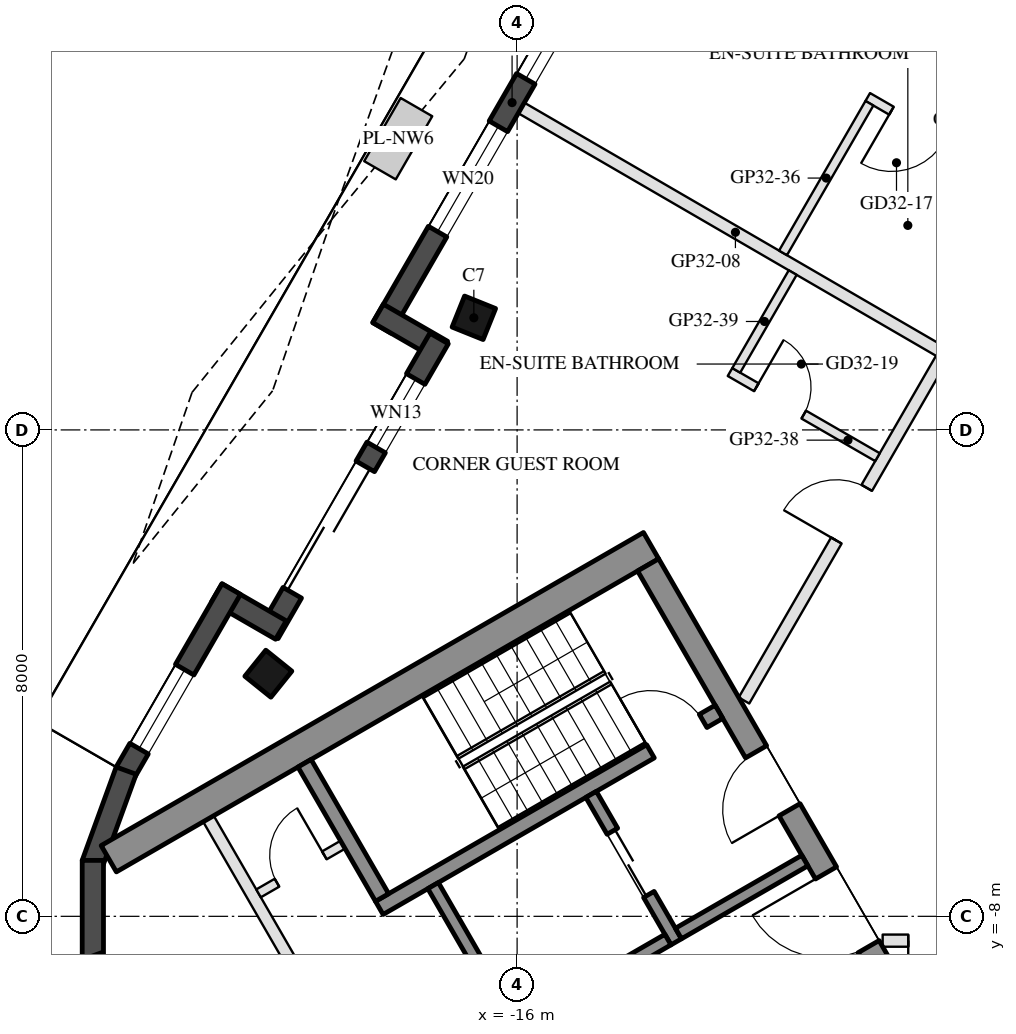
"""IFC4 building model, lengths in metres.
Left out: names, types, materials, properties, quantities, classifications, styles, units other than length and angle.
Written with IfcOpenShell. Run it as: python <this file> out.ifc"""

import sys

from ifc_helpers import new_model, si_unit, direction, frame, frame_2d, origin, origin_2d, place, context, subcontext, project, spatial, rectangle, hollow_rectangle, extrude, boolean, halfspace, element, fill, save


model = new_model("IFC4")
c1 = context("Model", 3, precision=1e-05, world=origin(), true_north=direction((0.0, 1.0)))
c2 = subcontext(c1, "Body", "Model", "MODEL_VIEW")
j1 = project(units=[si_unit("LENGTHUNIT", "METRE"), si_unit("PLANEANGLEUNIT", "RADIAN")], contexts=[c1])
p1 = place(None, origin())
s1 = spatial("IfcSite", under=j1, at=p1, CompositionType="ELEMENT")
p2 = place(p1, origin())
s2 = spatial("IfcBuilding", under=s1, at=p2, CompositionType="ELEMENT")
p3 = place(p2, frame((0.0, 0.0, 309.6)))
s3 = spatial("IfcBuildingStorey", under=s2, at=p3, CompositionType="ELEMENT", Elevation=309.6)
p4 = place(p3, frame((-16.711, 1.844, 0.0), z_axis=(0.161388519526, -0.022915997932, 0.986624854139), x_axis=(-0.495109873729, -0.866696335889, 0.060857820306)))
e1 = element("IfcColumn", 1, at=p4, inside=s3, PredefinedType="COLUMN", context=c2, shape_type="SweptSolid", body=[
    boolean("DIFFERENCE", boolean("DIFFERENCE", extrude(hollow_rectangle(XDim=0.55, YDim=0.55, WallThickness=0.025, at=origin_2d()), origin(), (0.0, 0.0, 1.0), 3.75), halfspace(frame((0.0, 0.0, 0.034), z_axis=(0.0, 0.0, 1.0), x_axis=(1.0, 0.0, 0.0)), True)), halfspace(frame((0.0, 0.0, 3.716), z_axis=(0.0, 0.0, 1.0), x_axis=(1.0, 0.0, 0.0)), False)),
])
p5 = place(p3, frame((-20.091, -4.01, 0.0), z_axis=(0.190797858838, 0.029652330963, 0.981181388088), x_axis=(-0.488342494533, -0.86421146304, 0.121079127777)))
e2 = element("IfcColumn", 2, at=p5, inside=s3, PredefinedType="COLUMN", context=c2, shape_type="SweptSolid", body=[
    boolean("DIFFERENCE", boolean("DIFFERENCE", extrude(hollow_rectangle(XDim=0.55, YDim=0.55, WallThickness=0.025, at=origin_2d()), origin(), (0.0, 0.0, 1.0), 3.771), halfspace(frame((0.0, 0.0, 0.04), z_axis=(0.0, 0.0, 1.0), x_axis=(1.0, 0.0, 0.0)), True)), halfspace(frame((0.0, 0.0, 3.731), z_axis=(0.0, 0.0, 1.0), x_axis=(1.0, 0.0, 0.0)), False)),
])
p6 = place(p3, frame((-13.943, 9.089, 0.0), z_axis=(0.0, 0.0, 1.0), x_axis=(-0.500013816581, -0.866017426631, 0.0)))
e3 = element("IfcWall", 3, at=p6, inside=s3, PredefinedType="SOLIDWALL", context=c2, shape_type="SweptSolid", body=[
    extrude(rectangle(XDim=8.559, YDim=0.35, at=frame_2d((4.279, 0.0))), origin(), (0.0, 0.0, 1.0), 3.55),
])
p7 = place(p6, frame((1.528, 0.0, 0.3)))
e4 = element("IfcOpeningElement", 4, at=p7, cuts=e3, PredefinedType="OPENING", context=c2, shape_type="SweptSolid", body=[
    extrude(rectangle(XDim=2.3, YDim=2.65, at=frame_2d((1.15, 1.325))), frame((0.0, 0.185, 0.0), z_axis=(0.0, -1.0, 0.0), x_axis=(1.0, 0.0, 0.0)), (0.0, 0.0, 1.0), 0.37),
])
p8 = place(p6, frame((4.729, 0.0, 0.3)))
e5 = element("IfcOpeningElement", 5, at=p8, cuts=e3, PredefinedType="OPENING", context=c2, shape_type="SweptSolid", body=[
    extrude(rectangle(XDim=2.0, YDim=2.65, at=frame_2d((1.0, 1.325))), frame((0.0, 0.185, 0.0), z_axis=(0.0, -1.0, 0.0), x_axis=(1.0, 0.0, 0.0)), (0.0, 0.0, 1.0), 0.37),
])
p9 = place(p3, frame((-18.287, 1.916, 0.0), z_axis=(0.0, 0.0, 1.0), x_axis=(0.866142280446, -0.499797509021, 0.0)))
e6 = element("IfcWall", 6, at=p9, inside=s3, PredefinedType="SOLIDWALL", context=c2, shape_type="SweptSolid", body=[
    extrude(rectangle(XDim=1.22, YDim=0.35, at=frame_2d((0.61, 0.0))), origin(), (0.0, 0.0, 1.0), 3.55),
])
p10 = place(p3, frame((-17.283, 1.504, 0.0), z_axis=(0.0, 0.0, 1.0), x_axis=(-0.500008054862, -0.866020753258, 0.0)))
e7 = element("IfcWall", 7, at=p10, inside=s3, PredefinedType="SOLIDWALL", context=c2, shape_type="SweptSolid", body=[
    extrude(rectangle(XDim=5.599, YDim=0.35, at=frame_2d((2.8, 0.0))), origin(), (0.0, 0.0, 1.0), 3.55),
])
p11 = place(p10, frame((2.429, 0.0, 0.0)))
e8 = element("IfcOpeningElement", 8, at=p11, cuts=e7, PredefinedType="OPENING", context=c2, shape_type="SweptSolid", body=[
    extrude(rectangle(XDim=2.4, YDim=2.4, at=frame_2d((1.2, 1.2))), frame((0.0, 0.185, 0.0), z_axis=(0.0, -1.0, 0.0), x_axis=(1.0, 0.0, 0.0)), (0.0, 0.0, 1.0), 0.37),
])
p12 = place(p10, frame((0.77, 0.0, 0.3)))
e9 = element("IfcOpeningElement", 9, at=p12, cuts=e7, PredefinedType="OPENING", context=c2, shape_type="SweptSolid", body=[
    extrude(rectangle(XDim=1.3, YDim=2.65, at=frame_2d((0.65, 1.325))), frame((0.0, 0.185, 0.0), z_axis=(0.0, -1.0, 0.0), x_axis=(1.0, 0.0, 0.0)), (0.0, 0.0, 1.0), 0.37),
])
p13 = place(p3, frame((-19.884, -3.292, 0.0), z_axis=(0.0, 0.0, 1.0), x_axis=(-0.866005645448, 0.500034220881, 0.0)))
e10 = element("IfcWall", 10, at=p13, inside=s3, PredefinedType="SOLIDWALL", context=c2, shape_type="SweptSolid", body=[
    extrude(rectangle(XDim=1.22, YDim=0.35, at=frame_2d((0.61, 0.0))), origin(), (0.0, 0.0, 1.0), 3.55),
])
p14 = place(p3, frame((-20.702, -2.618, 0.0), z_axis=(0.0, 0.0, 1.0), x_axis=(-0.499979528911, -0.866037222451, 0.0)))
e11 = element("IfcWall", 11, at=p14, inside=s3, PredefinedType="SOLIDWALL", context=c2, shape_type="SweptSolid", body=[
    extrude(rectangle(XDim=3.48, YDim=0.35, at=frame_2d((1.74, 0.0))), origin(), (0.0, 0.0, 1.0), 3.55),
])
p15 = place(p14, frame((1.531, 0.0, 0.3)))
e12 = element("IfcOpeningElement", 12, at=p15, cuts=e11, PredefinedType="OPENING", context=c2, shape_type="SweptSolid", body=[
    extrude(rectangle(XDim=1.5, YDim=2.65, at=frame_2d((0.75, 1.325))), frame((0.0, 0.185, 0.0), z_axis=(0.0, -1.0, 0.0), x_axis=(1.0, 0.0, 0.0)), (0.0, 0.0, 1.0), 0.37),
])
for number, where, z_axis, x_axis in (
    (13, (-22.429, -5.604, 0.0), (0.0, 0.0, 1.0), (-0.342, -0.94, 0.0)),
    (14, (-22.977, -7.08, 0.0), (0.0, 0.0, 1.0), (0.0, -1.0, 0.0)),
    (15, (-22.988, -8.654, 0.0), (0.0, 0.0, 1.0), (0.342, -0.94, 0.0)),
):
    element("IfcWall", number, at=place(p3, frame(where, z_axis=z_axis, x_axis=x_axis)), inside=s3, PredefinedType="SOLIDWALL", context=c2, shape_type="SweptSolid", body=[
        extrude(rectangle(XDim=1.634, YDim=0.35, at=frame_2d((0.817, 0.0))), origin(), (0.0, 0.0, 1.0), 3.55),
    ])
p16 = place(p3, frame((-13.797, -1.903, 0.0), z_axis=(0.0, 0.0, 1.0), x_axis=(-0.866027279078, -0.499996751883, 0.0)))
e16 = element("IfcWall", 16, at=p16, inside=s3, PredefinedType="SHEAR", context=c2, shape_type="SweptSolid", body=[
    extrude(rectangle(XDim=10.298, YDim=0.5, at=frame_2d((5.149, 0.0))), origin(), (0.0, 0.0, 1.0), 3.5),
])
p17 = place(p3, frame((-13.845, -2.22, 0.0), z_axis=(0.0, 0.0, 1.0), x_axis=(0.500004234368, -0.866022959057, 0.0)))
e17 = element("IfcWall", 17, at=p17, inside=s3, PredefinedType="SHEAR", context=c2, shape_type="SweptSolid", body=[
    extrude(rectangle(XDim=10.0, YDim=0.4, at=frame_2d((5.0, 0.0))), origin(), (0.0, 0.0, 1.0), 3.5),
])
p18 = place(p17, frame((3.55, 0.0, 0.0)))
e18 = element("IfcOpeningElement", 18, at=p18, cuts=e17, PredefinedType="OPENING", context=c2, shape_type="SweptSolid", body=[
    extrude(rectangle(XDim=1.1, YDim=2.1, at=frame_2d((0.55, 1.05))), frame((0.0, 0.21, 0.0), z_axis=(0.0, -1.0, 0.0), x_axis=(1.0, 0.0, 0.0)), (0.0, 0.0, 1.0), 0.42),
])
p19 = place(p17, frame((5.85, 0.0, 0.0)))
e19 = element("IfcOpeningElement", 19, at=p19, cuts=e17, PredefinedType="OPENING", context=c2, shape_type="SweptSolid", body=[
    extrude(rectangle(XDim=1.4, YDim=2.1, at=frame_2d((0.7, 1.05))), frame((0.0, 0.21, 0.0), z_axis=(0.0, -1.0, 0.0), x_axis=(1.0, 0.0, 0.0)), (0.0, 0.0, 1.0), 0.42),
])
p20 = place(p3, frame((-12.681, -4.636, 0.0), z_axis=(0.0, 0.0, 1.0), x_axis=(-0.866021702275, -0.500006411147, 0.0)))
e20 = element("IfcWall", 20, at=p20, inside=s3, PredefinedType="SHEAR", context=c2, shape_type="SweptSolid", body=[
    extrude(rectangle(XDim=6.45, YDim=0.25, at=frame_2d((3.225, 0.0))), origin(), (0.0, 0.0, 1.0), 3.5),
])
p21 = place(p20, frame((0.3, 0.0, 0.0)))
e21 = element("IfcOpeningElement", 21, at=p21, cuts=e20, PredefinedType="OPENING", context=c2, shape_type="SweptSolid", body=[
    extrude(rectangle(XDim=1.0, YDim=2.1, at=frame_2d((0.5, 1.05))), frame((0.0, 0.135, 0.0), z_axis=(0.0, -1.0, 0.0), x_axis=(1.0, 0.0, 0.0)), (0.0, 0.0, 1.0), 0.27),
])
p22 = place(p3, frame((-19.496, -5.482, 0.0), z_axis=(0.0, 0.0, 1.0), x_axis=(0.499990435942, -0.866030925526, 0.0)))
e22 = element("IfcWall", 22, at=p22, inside=s3, PredefinedType="SHEAR", context=c2, shape_type="SweptSolid", body=[
    extrude(rectangle(XDim=2.55, YDim=0.25, at=frame_2d((1.275, 0.0))), origin(), (0.0, 0.0, 1.0), 3.5),
])
p23 = place(p3, frame((-17.381, -7.495, 0.0), z_axis=(0.0, 0.0, 1.0), x_axis=(0.500011755427, -0.866018616679, 0.0)))
e23 = element("IfcWall", 23, at=p23, inside=s3, PredefinedType="SHEAR", context=c2, shape_type="SweptSolid", body=[
    extrude(rectangle(XDim=2.8, YDim=0.2, at=frame_2d((1.4, 0.0))), origin(), (0.0, 0.0, 1.0), 3.5),
])
p24 = place(p3, frame((-14.783, -5.995, 0.0), z_axis=(0.0, 0.0, 1.0), x_axis=(0.49994636267, -0.866056369097, 0.0)))
e24 = element("IfcWall", 24, at=p24, inside=s3, PredefinedType="SHEAR", context=c2, shape_type="SweptSolid", body=[
    extrude(rectangle(XDim=2.8, YDim=0.2, at=frame_2d((1.4, 0.0))), origin(), (0.0, 0.0, 1.0), 3.5),
])
p25 = place(p24, frame((0.7, 0.0, 0.0)))
e25 = element("IfcOpeningElement", 25, at=p25, cuts=e24, PredefinedType="OPENING", context=c2, shape_type="SweptSolid", body=[
    extrude(rectangle(XDim=1.2, YDim=2.1, at=frame_2d((0.6, 1.05))), frame((0.0, 0.11, 0.0), z_axis=(0.0, -1.0, 0.0), x_axis=(1.0, 0.0, 0.0)), (0.0, 0.0, 1.0), 0.22),
])
p26 = place(p3, frame((-13.52, -8.383, 0.0), z_axis=(0.0, 0.0, 1.0), x_axis=(-0.866034573852, -0.49998411664, 0.0)))
e26 = element("IfcWall", 26, at=p26, inside=s3, PredefinedType="SHEAR", context=c2, shape_type="SweptSolid", body=[
    extrude(rectangle(XDim=2.8, YDim=0.2, at=frame_2d((1.4, 0.0))), origin(), (0.0, 0.0, 1.0), 3.5),
])
p27 = place(p3, frame((-11.268, -7.083, 0.0), z_axis=(0.0, 0.0, 1.0), x_axis=(-0.866050077142, -0.499957262057, 0.0)))
e27 = element("IfcWall", 27, at=p27, inside=s3, PredefinedType="SHEAR", context=c2, shape_type="SweptSolid", body=[
    extrude(rectangle(XDim=2.4, YDim=0.2, at=frame_2d((1.2, 0.0))), origin(), (0.0, 0.0, 1.0), 3.5),
])
p28 = place(p3, frame((-21.076, -6.395, 0.0), z_axis=(0.0, 0.0, 1.0), x_axis=(0.50001468107, -0.866016927499, 0.0)))
e28 = element("IfcWall", 28, at=p28, inside=s3, PredefinedType="PARTITIONING", context=c2, shape_type="SweptSolid", body=[
    extrude(rectangle(XDim=5.4, YDim=0.2, at=frame_2d((2.7, 0.0))), origin(), (0.0, 0.0, 1.0), 3.5),
])
p29 = place(p28, frame((2.9, 0.0, 0.0)))
e29 = element("IfcOpeningElement", 29, at=p29, cuts=e28, PredefinedType="OPENING", context=c2, shape_type="SweptSolid", body=[
    extrude(rectangle(XDim=0.9, YDim=2.1, at=frame_2d((0.45, 1.05))), frame((0.0, 0.11, 0.0), z_axis=(0.0, -1.0, 0.0), x_axis=(1.0, 0.0, 0.0)), (0.0, 0.0, 1.0), 0.22),
])
p30 = place(p3, frame((-18.866, -6.822, 0.0), z_axis=(0.0, 0.0, 1.0), x_axis=(-0.866028054938, -0.499995408039, 0.0)))
e30 = element("IfcWall", 30, at=p30, inside=s3, PredefinedType="PARTITIONING", context=c2, shape_type="SweptSolid", body=[
    extrude(rectangle(XDim=1.6, YDim=0.15, at=frame_2d((0.8, 0.0))), origin(), (0.0, 0.0, 1.0), 3.5),
])
p31 = place(p30, frame((0.35, 0.0, 0.0)))
e31 = element("IfcOpeningElement", 31, at=p31, cuts=e30, PredefinedType="OPENING", context=c2, shape_type="SweptSolid", body=[
    extrude(rectangle(XDim=0.9, YDim=2.1, at=frame_2d((0.45, 1.05))), frame((0.0, 0.085, 0.0), z_axis=(0.0, -1.0, 0.0), x_axis=(1.0, 0.0, 0.0)), (0.0, 0.0, 1.0), 0.17),
])
p32 = place(p3, frame((-15.931, 5.296, 0.0), z_axis=(0.0, 0.0, 1.0), x_axis=(0.86472973631, -0.502237476839, 0.0)))
e32 = element("IfcWall", 32, at=p32, inside=s3, PredefinedType="PARTITIONING", context=c2, shape_type="SweptSolid", body=[
    extrude(rectangle(XDim=8.145, YDim=0.2, at=frame_2d((4.072, 0.0))), origin(), (0.0, 0.0, 1.0), 3.1),
])
p33 = place(p3, frame((-5.585, -8.4, 0.0), z_axis=(0.0, 0.0, 1.0), x_axis=(-1.0, 0.0, 0.0)))
e33 = element("IfcWall", 33, at=p33, inside=s3, PredefinedType="PARTITIONING", context=c2, shape_type="SweptSolid", body=[
    extrude(rectangle(XDim=4.403, YDim=0.2, at=frame_2d((2.201, 0.0))), origin(), (0.0, 0.0, 1.0), 3.1),
])
p34 = place(p33, frame((2.982, 0.0, 0.0)))
e34 = element("IfcOpeningElement", 34, at=p34, cuts=e33, PredefinedType="OPENING", context=c2, shape_type="SweptSolid", body=[
    extrude(rectangle(XDim=1.0, YDim=2.1, at=frame_2d((0.5, 1.05))), frame((0.0, 0.11, 0.0), z_axis=(0.0, -1.0, 0.0), x_axis=(1.0, 0.0, 0.0)), (0.0, 0.0, 1.0), 0.22),
])
p35 = place(p3, frame((-7.549, 3.925, 0.0), z_axis=(0.0, 0.0, 1.0), x_axis=(-0.866063626216, 0.499933790963, 0.0)))
e35 = element("IfcWall", 35, at=p35, inside=s3, PredefinedType="PARTITIONING", context=c2, shape_type="SweptSolid", body=[
    extrude(rectangle(XDim=3.1, YDim=0.15, at=frame_2d((1.55, 0.0))), origin(), (0.0, 0.0, 1.0), 3.55),
])
p36 = place(p35, frame((1.65, 0.0, 0.0)))
e36 = element("IfcOpeningElement", 36, at=p36, cuts=e35, PredefinedType="OPENING", context=c2, shape_type="SweptSolid", body=[
    extrude(rectangle(XDim=1.0, YDim=2.1, at=frame_2d((0.5, 1.05))), frame((0.0, 0.085, 0.0), z_axis=(0.0, -1.0, 0.0), x_axis=(1.0, 0.0, 0.0)), (0.0, 0.0, 1.0), 0.17),
])
p37 = place(p3, frame((-10.206, 5.373, 0.0), z_axis=(0.0, 0.0, 1.0), x_axis=(-0.500009958894, -0.866019653938, 0.0)))
e37 = element("IfcWall", 37, at=p37, inside=s3, PredefinedType="PARTITIONING", context=c2, shape_type="SweptSolid", body=[
    extrude(rectangle(XDim=2.842, YDim=0.15, at=frame_2d((1.421, 0.0))), origin(), (0.0, 0.0, 1.0), 3.1),
])
p38 = place(p3, frame((-12.269, -4.45, 0.0), z_axis=(0.0, 0.0, 1.0), x_axis=(0.500024296538, 0.866011375717, 0.0)))
e38 = element("IfcWall", 38, at=p38, inside=s3, PredefinedType="PARTITIONING", context=c2, shape_type="SweptSolid", body=[
    extrude(rectangle(XDim=6.488, YDim=0.2, at=frame_2d((3.244, 0.0))), origin(), (0.0, 0.0, 1.0), 3.1),
])
p39 = place(p38, frame((3.038, 0.0, 0.0)))
e39 = element("IfcOpeningElement", 39, at=p39, cuts=e38, PredefinedType="OPENING", context=c2, shape_type="SweptSolid", body=[
    extrude(rectangle(XDim=1.0, YDim=2.1, at=frame_2d((0.5, 1.05))), frame((0.0, 0.11, 0.0), z_axis=(0.0, -1.0, 0.0), x_axis=(1.0, 0.0, 0.0)), (0.0, 0.0, 1.0), 0.22),
])
p40 = place(p3, frame((-12.499, 0.952, 0.0), z_axis=(0.0, 0.0, 1.0), x_axis=(0.865996816683, -0.500049511043, 0.0)))
e40 = element("IfcWall", 40, at=p40, inside=s3, PredefinedType="PARTITIONING", context=c2, shape_type="SweptSolid", body=[
    extrude(rectangle(XDim=2.8, YDim=0.15, at=frame_2d((1.4, 0.0))), origin(), (0.0, 0.0, 1.0), 3.55),
])
p41 = place(p40, frame((0.5, 0.0, 0.0)))
e41 = element("IfcOpeningElement", 41, at=p41, cuts=e40, PredefinedType="OPENING", context=c2, shape_type="SweptSolid", body=[
    extrude(rectangle(XDim=0.9, YDim=2.1, at=frame_2d((0.45, 1.05))), frame((0.0, 0.085, 0.0), z_axis=(0.0, -1.0, 0.0), x_axis=(1.0, 0.0, 0.0)), (0.0, 0.0, 1.0), 0.17),
])
p42 = place(p3, frame((-11.468, 2.587, 0.0), z_axis=(0.0, 0.0, 1.0), x_axis=(-0.499999386358, -0.86602575807, 0.0)))
e42 = element("IfcWall", 42, at=p42, inside=s3, PredefinedType="PARTITIONING", context=c2, shape_type="SweptSolid", body=[
    extrude(rectangle(XDim=1.857, YDim=0.15, at=frame_2d((0.928, 0.0))), origin(), (0.0, 0.0, 1.0), 3.55),
])
p43 = place(p7, origin())
e43 = element("IfcWindow", 43, at=p43, inside=s3, PartitioningType="SINGLE_PANEL", PredefinedType="WINDOW", context=c2, shape_type="SweptSolid", body=[
    extrude(rectangle(XDim=2.3, YDim=2.65, at=frame_2d((1.15, 1.325))), frame((0.0, 0.03, 0.0), z_axis=(0.0, -1.0, 0.0), x_axis=(1.0, 0.0, 0.0)), (0.0, 0.0, 1.0), 0.06),
])
fill(e4, e43)
p44 = place(p8, origin())
e44 = element("IfcWindow", 44, at=p44, inside=s3, PartitioningType="SINGLE_PANEL", PredefinedType="WINDOW", context=c2, shape_type="SweptSolid", body=[
    extrude(rectangle(XDim=2.0, YDim=2.65, at=frame_2d((1.0, 1.325))), frame((0.0, 0.03, 0.0), z_axis=(0.0, -1.0, 0.0), x_axis=(1.0, 0.0, 0.0)), (0.0, 0.0, 1.0), 0.06),
])
fill(e5, e44)
p45 = place(p11, frame((2.4, 0.0, 0.0), z_axis=(0.0, 0.0, 1.0), x_axis=(-1.0, 0.0, 0.0)))
e45 = element("IfcDoor", 45, at=p45, inside=s3, OperationType="SLIDING_TO_LEFT", PredefinedType="DOOR", context=c2, shape_type="SweptSolid", body=[
    extrude(rectangle(XDim=2.4, YDim=2.4, at=frame_2d((1.2, 1.2))), frame((0.0, 0.025, 0.0), z_axis=(0.0, -1.0, 0.0), x_axis=(1.0, 0.0, 0.0)), (0.0, 0.0, 1.0), 0.05),
])
fill(e8, e45)
p46 = place(p12, origin())
e46 = element("IfcWindow", 46, at=p46, inside=s3, PartitioningType="SINGLE_PANEL", PredefinedType="WINDOW", context=c2, shape_type="SweptSolid", body=[
    extrude(rectangle(XDim=1.3, YDim=2.65, at=frame_2d((0.65, 1.325))), frame((0.0, 0.03, 0.0), z_axis=(0.0, -1.0, 0.0), x_axis=(1.0, 0.0, 0.0)), (0.0, 0.0, 1.0), 0.06),
])
fill(e9, e46)
p47 = place(p15, origin())
e47 = element("IfcWindow", 47, at=p47, inside=s3, PartitioningType="SINGLE_PANEL", PredefinedType="WINDOW", context=c2, shape_type="SweptSolid", body=[
    extrude(rectangle(XDim=1.5, YDim=2.65, at=frame_2d((0.75, 1.325))), frame((0.0, 0.03, 0.0), z_axis=(0.0, -1.0, 0.0), x_axis=(1.0, 0.0, 0.0)), (0.0, 0.0, 1.0), 0.06),
])
fill(e12, e47)
p48 = place(p25, origin())
e48 = element("IfcDoor", 48, at=p48, inside=s3, OperationType="DOUBLE_DOOR_SLIDING", PredefinedType="DOOR", context=c2, shape_type="SweptSolid", body=[
    extrude(rectangle(XDim=1.2, YDim=2.1, at=frame_2d((0.6, 1.05))), frame((0.0, 0.025, 0.0), z_axis=(0.0, -1.0, 0.0), x_axis=(1.0, 0.0, 0.0)), (0.0, 0.0, 1.0), 0.05),
])
fill(e25, e48)
p49 = place(p31, frame((0.9, 0.0, 0.0), z_axis=(0.0, 0.0, 1.0), x_axis=(-1.0, 0.0, 0.0)))
e49 = element("IfcDoor", 49, at=p49, inside=s3, OperationType="SINGLE_SWING_RIGHT", PredefinedType="DOOR", context=c2, shape_type="SweptSolid", body=[
    extrude(rectangle(XDim=0.9, YDim=2.1, at=frame_2d((0.45, 1.05))), frame((0.0, 0.025, 0.0), z_axis=(0.0, -1.0, 0.0), x_axis=(1.0, 0.0, 0.0)), (0.0, 0.0, 1.0), 0.05),
])
fill(e31, e49)
p50 = place(p18, frame((1.1, 0.0, 0.0), z_axis=(0.0, 0.0, 1.0), x_axis=(-1.0, 0.0, 0.0)))
e50 = element("IfcDoor", 50, at=p50, inside=s3, OperationType="SINGLE_SWING_LEFT", PredefinedType="DOOR", context=c2, shape_type="SweptSolid", body=[
    extrude(rectangle(XDim=1.1, YDim=2.1, at=frame_2d((0.55, 1.05))), frame((0.0, 0.025, 0.0), z_axis=(0.0, -1.0, 0.0), x_axis=(1.0, 0.0, 0.0)), (0.0, 0.0, 1.0), 0.05),
])
fill(e18, e50)
p51 = place(p19, frame((1.4, 0.0, 0.0), z_axis=(0.0, 0.0, 1.0), x_axis=(-1.0, 0.0, 0.0)))
e51 = element("IfcDoor", 51, at=p51, inside=s3, OperationType="DOUBLE_DOOR_SINGLE_SWING", PredefinedType="DOOR", context=c2, shape_type="SweptSolid", body=[
    extrude(rectangle(XDim=1.4, YDim=2.1, at=frame_2d((0.7, 1.05))), frame((0.0, 0.025, 0.0), z_axis=(0.0, -1.0, 0.0), x_axis=(1.0, 0.0, 0.0)), (0.0, 0.0, 1.0), 0.05),
])
fill(e19, e51)
p52 = place(p21, frame((1.0, 0.0, 0.0), z_axis=(0.0, 0.0, 1.0), x_axis=(-1.0, 0.0, 0.0)))
e52 = element("IfcDoor", 52, at=p52, inside=s3, OperationType="SINGLE_SWING_LEFT", PredefinedType="DOOR", context=c2, shape_type="SweptSolid", body=[
    extrude(rectangle(XDim=1.0, YDim=2.1, at=frame_2d((0.5, 1.05))), frame((0.0, 0.025, 0.0), z_axis=(0.0, -1.0, 0.0), x_axis=(1.0, 0.0, 0.0)), (0.0, 0.0, 1.0), 0.05),
])
fill(e21, e52)
p53 = place(p34, origin())
e53 = element("IfcDoor", 53, at=p53, inside=s3, OperationType="SINGLE_SWING_RIGHT", PredefinedType="DOOR", context=c2, shape_type="SweptSolid", body=[
    extrude(rectangle(XDim=1.0, YDim=2.1, at=frame_2d((0.5, 1.05))), frame((0.0, 0.025, 0.0), z_axis=(0.0, -1.0, 0.0), x_axis=(1.0, 0.0, 0.0)), (0.0, 0.0, 1.0), 0.05),
])
fill(e34, e53)
p54 = place(p36, origin())
e54 = element("IfcDoor", 54, at=p54, inside=s3, OperationType="SINGLE_SWING_RIGHT", PredefinedType="DOOR", context=c2, shape_type="SweptSolid", body=[
    extrude(rectangle(XDim=1.0, YDim=2.1, at=frame_2d((0.5, 1.05))), frame((0.0, 0.025, 0.0), z_axis=(0.0, -1.0, 0.0), x_axis=(1.0, 0.0, 0.0)), (0.0, 0.0, 1.0), 0.05),
])
fill(e36, e54)
p55 = place(p41, origin())
e55 = element("IfcDoor", 55, at=p55, inside=s3, OperationType="SINGLE_SWING_LEFT", PredefinedType="DOOR", context=c2, shape_type="SweptSolid", body=[
    extrude(rectangle(XDim=0.9, YDim=2.1, at=frame_2d((0.45, 1.05))), frame((0.0, 0.025, 0.0), z_axis=(0.0, -1.0, 0.0), x_axis=(1.0, 0.0, 0.0)), (0.0, 0.0, 1.0), 0.05),
])
fill(e41, e55)
p56 = place(p39, origin())
e56 = element("IfcDoor", 56, at=p56, inside=s3, OperationType="SINGLE_SWING_LEFT", PredefinedType="DOOR", context=c2, shape_type="SweptSolid", body=[
    extrude(rectangle(XDim=1.0, YDim=2.1, at=frame_2d((0.5, 1.05))), frame((0.0, 0.025, 0.0), z_axis=(0.0, -1.0, 0.0), x_axis=(1.0, 0.0, 0.0)), (0.0, 0.0, 1.0), 0.05),
])
fill(e39, e56)
save(model, sys.argv[1])
